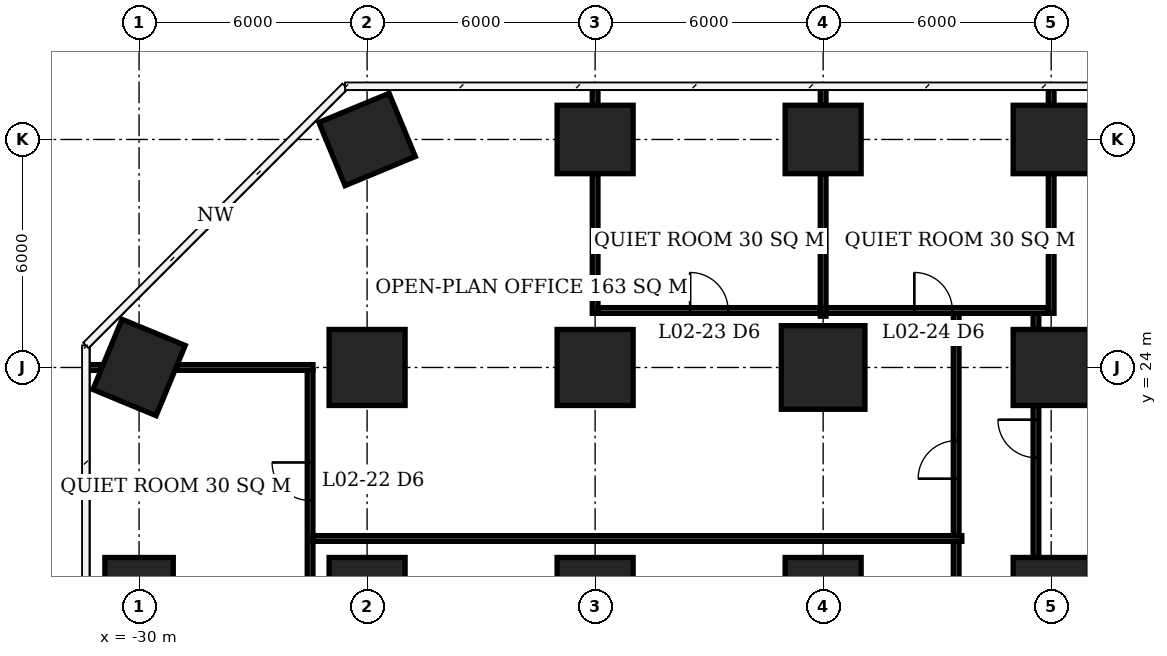
"""IFC4 building model, lengths in metres.
Left out: names, types, materials, properties, quantities, classifications, styles, units other than length and angle.
Written with IfcOpenShell. Run it as: python <this file> out.ifc"""

import sys

from ifc_helpers import new_model, si_unit, direction, frame, frame_2d, origin, origin_2d, place, context, subcontext, project, spatial, rectangle, extrude, element, fill, save


model = new_model("IFC4")
c1 = context("Model", 3, precision=1e-05, world=origin(), true_north=direction((0.0, 1.0)))
c2 = subcontext(c1, "Body", "Model", "MODEL_VIEW")
j1 = project(units=[si_unit("LENGTHUNIT", "METRE"), si_unit("PLANEANGLEUNIT", "RADIAN")], contexts=[c1])
p1 = place(None, origin())
s1 = spatial("IfcSite", under=j1, at=p1, CompositionType="ELEMENT")
p2 = place(p1, origin())
s2 = spatial("IfcBuilding", under=s1, at=p2, CompositionType="ELEMENT")
p3 = place(p2, frame((0.0, 0.0, 11.0)))
s3 = spatial("IfcBuildingStorey", under=s2, at=p3, CompositionType="ELEMENT", Elevation=11.0)
for number, where, z_axis, x_axis in (
    (1, (-30.0, 18.0, 0.0), (0.0, 0.0, 1.0), (0.0, 1.0, 0.0)),
    (2, (-30.0, 24.0, 0.0), (0.0, 0.0, 1.0), (0.383, 0.924, 0.0)),
):
    element("IfcColumn", number, at=place(p3, frame(where, z_axis=z_axis, x_axis=x_axis)), inside=s3, PredefinedType="COLUMN", context=c2, shape_type="SweptSolid", body=[
        extrude(rectangle(XDim=2.0, YDim=1.8, at=origin_2d()), origin(), (0.0, 0.0, 1.0), 7.2),
    ])
for number, where, z_axis, x_axis in (
    (3, (-24.0, 18.0, 0.0), (0.0, 0.0, 1.0), (1.0, 0.0, 0.0)),
    (4, (-24.0, 24.0, 0.0), (0.0, 0.0, 1.0), (1.0, 0.0, 0.0)),
):
    element("IfcColumn", number, at=place(p3, frame(where, z_axis=z_axis, x_axis=x_axis)), inside=s3, PredefinedType="COLUMN", context=c2, shape_type="SweptSolid", body=[
        extrude(rectangle(XDim=2.0, YDim=2.0, at=origin_2d()), origin(), (0.0, 0.0, 1.0), 7.2),
    ])
p4 = place(p3, frame((-24.0, 30.0, 0.0), z_axis=(0.0, 0.0, 1.0), x_axis=(0.923879532511, 0.382683432365, 0.0)))
e5 = element("IfcColumn", 5, at=p4, inside=s3, PredefinedType="COLUMN", context=c2, shape_type="SweptSolid", body=[
    extrude(rectangle(XDim=2.0, YDim=1.8, at=origin_2d()), origin(), (0.0, 0.0, 1.0), 7.2),
])
for number, where, z_axis, x_axis in (
    (6, (-18.0, 18.0, 0.0), (0.0, 0.0, 1.0), (1.0, 0.0, 0.0)),
    (7, (-18.0, 24.0, 0.0), (0.0, 0.0, 1.0), (1.0, 0.0, 0.0)),
):
    element("IfcColumn", number, at=place(p3, frame(where, z_axis=z_axis, x_axis=x_axis)), inside=s3, PredefinedType="COLUMN", context=c2, shape_type="SweptSolid", body=[
        extrude(rectangle(XDim=2.0, YDim=2.0, at=origin_2d()), origin(), (0.0, 0.0, 1.0), 7.2),
    ])
p5 = place(p3, frame((-18.0, 30.0, 0.0), z_axis=(0.0, 0.0, 1.0), x_axis=(1.0, 0.0, 0.0)))
e8 = element("IfcColumn", 8, at=p5, inside=s3, PredefinedType="COLUMN", context=c2, shape_type="SweptSolid", body=[
    extrude(rectangle(XDim=2.0, YDim=1.8, at=origin_2d()), origin(), (0.0, 0.0, 1.0), 7.2),
])
p6 = place(p3, frame((-12.0, 18.0, 0.0), z_axis=(0.0, 0.0, 1.0), x_axis=(1.0, 0.0, 0.0)))
e9 = element("IfcColumn", 9, at=p6, inside=s3, PredefinedType="COLUMN", context=c2, shape_type="SweptSolid", body=[
    extrude(rectangle(XDim=2.0, YDim=2.0, at=origin_2d()), origin(), (0.0, 0.0, 1.0), 7.2),
])
p7 = place(p3, frame((-12.0, 24.0, 0.0), z_axis=(0.0, 0.0, 1.0), x_axis=(1.0, 0.0, 0.0)))
e10 = element("IfcColumn", 10, at=p7, inside=s3, PredefinedType="COLUMN", context=c2, shape_type="SweptSolid", body=[
    extrude(rectangle(XDim=2.2, YDim=2.2, at=origin_2d()), origin(), (0.0, 0.0, 1.0), 7.2),
])
p8 = place(p3, frame((-12.0, 30.0, 0.0), z_axis=(0.0, 0.0, 1.0), x_axis=(1.0, 0.0, 0.0)))
e11 = element("IfcColumn", 11, at=p8, inside=s3, PredefinedType="COLUMN", context=c2, shape_type="SweptSolid", body=[
    extrude(rectangle(XDim=2.0, YDim=1.8, at=origin_2d()), origin(), (0.0, 0.0, 1.0), 7.2),
])
for number, where, z_axis, x_axis in (
    (12, (-6.0, 18.0, 0.0), (0.0, 0.0, 1.0), (1.0, 0.0, 0.0)),
    (13, (-6.0, 24.0, 0.0), (0.0, 0.0, 1.0), (1.0, 0.0, 0.0)),
):
    element("IfcColumn", number, at=place(p3, frame(where, z_axis=z_axis, x_axis=x_axis)), inside=s3, PredefinedType="COLUMN", context=c2, shape_type="SweptSolid", body=[
        extrude(rectangle(XDim=2.0, YDim=2.0, at=origin_2d()), origin(), (0.0, 0.0, 1.0), 7.2),
    ])
p9 = place(p3, frame((-6.0, 30.0, 0.0), z_axis=(0.0, 0.0, 1.0), x_axis=(1.0, 0.0, 0.0)))
e14 = element("IfcColumn", 14, at=p9, inside=s3, PredefinedType="COLUMN", context=c2, shape_type="SweptSolid", body=[
    extrude(rectangle(XDim=2.0, YDim=1.8, at=origin_2d()), origin(), (0.0, 0.0, 1.0), 7.2),
])
p10 = place(p3, frame((-31.375, 24.0, 0.0), z_axis=(0.0, 0.0, 1.0), x_axis=(1.0, 0.0, 0.0)))
e15 = element("IfcWall", 15, at=p10, inside=s3, PredefinedType="PARTITIONING", context=c2, shape_type="SweptSolid", body=[
    extrude(rectangle(XDim=0.37, YDim=0.15, at=frame_2d((0.185, 0.0))), origin(), (0.0, 0.0, 1.0), 6.8),
])
p11 = place(p3, frame((-28.995, 24.0, 0.0), z_axis=(0.0, 0.0, 1.0), x_axis=(1.0, 0.0, 0.0)))
e16 = element("IfcWall", 16, at=p11, inside=s3, PredefinedType="PARTITIONING", context=c2, shape_type="SweptSolid", body=[
    extrude(rectangle(XDim=3.57, YDim=0.15, at=frame_2d((1.785, 0.0))), origin(), (0.0, 0.0, 1.0), 6.8),
])
p12 = place(p3, frame((-17.925, 25.5, 0.0), z_axis=(0.0, 0.0, 1.0), x_axis=(1.0, 0.0, 0.0)))
e17 = element("IfcWall", 17, at=p12, inside=s3, PredefinedType="PARTITIONING", context=c2, shape_type="SweptSolid", body=[
    extrude(rectangle(XDim=5.85, YDim=0.15, at=frame_2d((2.925, 0.0))), origin(), (0.0, 0.0, 1.0), 6.8),
])
p13 = place(p12, frame((2.425, 0.0, 0.0)))
e18 = element("IfcOpeningElement", 18, at=p13, cuts=e17, PredefinedType="OPENING", context=c2, shape_type="SweptSolid", body=[
    extrude(rectangle(XDim=1.0, YDim=2.1, at=frame_2d((0.5, 1.05))), frame((0.0, 0.085, 0.0), z_axis=(0.0, -1.0, 0.0), x_axis=(1.0, 0.0, 0.0)), (0.0, 0.0, 1.0), 0.17),
])
p14 = place(p3, frame((-11.925, 25.5, 0.0), z_axis=(0.0, 0.0, 1.0), x_axis=(1.0, 0.0, 0.0)))
e19 = element("IfcWall", 19, at=p14, inside=s3, PredefinedType="PARTITIONING", context=c2, shape_type="SweptSolid", body=[
    extrude(rectangle(XDim=5.85, YDim=0.15, at=frame_2d((2.925, 0.0))), origin(), (0.0, 0.0, 1.0), 6.8),
])
p15 = place(p14, frame((2.325, 0.0, 0.0)))
e20 = element("IfcOpeningElement", 20, at=p15, cuts=e19, PredefinedType="OPENING", context=c2, shape_type="SweptSolid", body=[
    extrude(rectangle(XDim=1.0, YDim=2.1, at=frame_2d((0.5, 1.05))), frame((0.0, 0.085, 0.0), z_axis=(0.0, -1.0, 0.0), x_axis=(1.0, 0.0, 0.0)), (0.0, 0.0, 1.0), 0.17),
])
p16 = place(p3, frame((-25.5, 18.075, 0.0), z_axis=(0.0, 0.0, 1.0), x_axis=(0.0, 1.0, 0.0)))
e21 = element("IfcWall", 21, at=p16, inside=s3, PredefinedType="PARTITIONING", context=c2, shape_type="SweptSolid", body=[
    extrude(rectangle(XDim=5.85, YDim=0.15, at=frame_2d((2.925, 0.0))), origin(), (0.0, 0.0, 1.0), 6.8),
])
p17 = place(p16, frame((2.425, 0.0, 0.0)))
e22 = element("IfcOpeningElement", 22, at=p17, cuts=e21, PredefinedType="OPENING", context=c2, shape_type="SweptSolid", body=[
    extrude(rectangle(XDim=1.0, YDim=2.1, at=frame_2d((0.5, 1.05))), frame((0.0, 0.085, 0.0), z_axis=(0.0, -1.0, 0.0), x_axis=(1.0, 0.0, 0.0)), (0.0, 0.0, 1.0), 0.17),
])
p18 = place(p3, frame((-18.0, 25.425, 0.0), z_axis=(0.0, 0.0, 1.0), x_axis=(0.0, 1.0, 0.0)))
e23 = element("IfcWall", 23, at=p18, inside=s3, PredefinedType="PARTITIONING", context=c2, shape_type="SweptSolid", body=[
    extrude(rectangle(XDim=3.675, YDim=0.15, at=frame_2d((1.837, 0.0))), origin(), (0.0, 0.0, 1.0), 6.8),
])
p19 = place(p3, frame((-18.0, 30.9, 0.0), z_axis=(0.0, 0.0, 1.0), x_axis=(0.0, 1.0, 0.0)))
e24 = element("IfcWall", 24, at=p19, inside=s3, PredefinedType="PARTITIONING", context=c2, shape_type="SweptSolid", body=[
    extrude(rectangle(XDim=0.475, YDim=0.15, at=frame_2d((0.238, 0.0))), origin(), (0.0, 0.0, 1.0), 6.8),
])
p20 = place(p3, frame((-12.0, 25.35, 0.0), z_axis=(0.0, 0.0, 1.0), x_axis=(0.0, 1.0, 0.0)))
e25 = element("IfcWall", 25, at=p20, inside=s3, PredefinedType="PARTITIONING", context=c2, shape_type="SweptSolid", body=[
    extrude(rectangle(XDim=3.75, YDim=0.15, at=frame_2d((1.875, 0.0))), origin(), (0.0, 0.0, 1.0), 6.8),
])
p21 = place(p3, frame((-12.0, 30.9, 0.0), z_axis=(0.0, 0.0, 1.0), x_axis=(0.0, 1.0, 0.0)))
e26 = element("IfcWall", 26, at=p21, inside=s3, PredefinedType="PARTITIONING", context=c2, shape_type="SweptSolid", body=[
    extrude(rectangle(XDim=0.475, YDim=0.15, at=frame_2d((0.238, 0.0))), origin(), (0.0, 0.0, 1.0), 6.8),
])
p22 = place(p3, frame((-6.0, 25.425, 0.0), z_axis=(0.0, 0.0, 1.0), x_axis=(0.0, 1.0, 0.0)))
e27 = element("IfcWall", 27, at=p22, inside=s3, PredefinedType="PARTITIONING", context=c2, shape_type="SweptSolid", body=[
    extrude(rectangle(XDim=3.675, YDim=0.15, at=frame_2d((1.837, 0.0))), origin(), (0.0, 0.0, 1.0), 6.8),
])
p23 = place(p3, frame((-6.0, 30.9, 0.0), z_axis=(0.0, 0.0, 1.0), x_axis=(0.0, 1.0, 0.0)))
e28 = element("IfcWall", 28, at=p23, inside=s3, PredefinedType="PARTITIONING", context=c2, shape_type="SweptSolid", body=[
    extrude(rectangle(XDim=0.475, YDim=0.15, at=frame_2d((0.238, 0.0))), origin(), (0.0, 0.0, 1.0), 6.8),
])
p24 = place(p3, frame((-25.425, 19.5, 0.0), z_axis=(0.0, 0.0, 1.0), x_axis=(1.0, 0.0, 0.0)))
e29 = element("IfcWall", 29, at=p24, inside=s3, PredefinedType="PARTITIONING", context=c2, shape_type="SweptSolid", body=[
    extrude(rectangle(XDim=17.075, YDim=0.15, at=frame_2d((8.538, 0.0))), origin(), (0.0, 0.0, 1.0), 6.95),
])
p25 = place(p3, frame((-8.5, 7.575, 0.0), z_axis=(0.0, 0.0, 1.0), x_axis=(0.0, 1.0, 0.0)))
e30 = element("IfcWall", 30, at=p25, inside=s3, PredefinedType="PARTITIONING", context=c2, shape_type="SweptSolid", body=[
    extrude(rectangle(XDim=11.85, YDim=0.15, at=frame_2d((5.925, 0.0))), origin(), (0.0, 0.0, 1.0), 6.95),
])
p26 = place(p25, frame((3.625, 0.0, 0.0)))
e31 = element("IfcOpeningElement", 31, at=p26, cuts=e30, PredefinedType="OPENING", context=c2, shape_type="SweptSolid", body=[
    extrude(rectangle(XDim=1.0, YDim=2.1, at=frame_2d((0.5, 1.05))), frame((0.0, 0.085, 0.0), z_axis=(0.0, -1.0, 0.0), x_axis=(1.0, 0.0, 0.0)), (0.0, 0.0, 1.0), 0.17),
])
p27 = place(p3, frame((-8.5, 19.575, 0.0), z_axis=(0.0, 0.0, 1.0), x_axis=(0.0, 1.0, 0.0)))
e32 = element("IfcWall", 32, at=p27, inside=s3, PredefinedType="PARTITIONING", context=c2, shape_type="SweptSolid", body=[
    extrude(rectangle(XDim=5.85, YDim=0.15, at=frame_2d((2.925, 0.0))), origin(), (0.0, 0.0, 1.0), 6.95),
])
p28 = place(p27, frame((1.499, 0.0, 0.0)))
e33 = element("IfcOpeningElement", 33, at=p28, cuts=e32, PredefinedType="OPENING", context=c2, shape_type="SweptSolid", body=[
    extrude(rectangle(XDim=1.0, YDim=2.1, at=frame_2d((0.5, 1.05))), frame((0.0, 0.085, 0.0), z_axis=(0.0, -1.0, 0.0), x_axis=(1.0, 0.0, 0.0)), (0.0, 0.0, 1.0), 0.17),
])
p29 = place(p3, frame((-6.4, 19.0, 0.0), z_axis=(0.0, 0.0, 1.0), x_axis=(0.0, 1.0, 0.0)))
e34 = element("IfcWall", 34, at=p29, inside=s3, PredefinedType="PARTITIONING", context=c2, shape_type="SweptSolid", body=[
    extrude(rectangle(XDim=4.0, YDim=0.15, at=frame_2d((2.0, 0.0))), origin(), (0.0, 0.0, 1.0), 6.95),
])
p30 = place(p29, frame((2.626, 0.0, 0.0)))
e35 = element("IfcOpeningElement", 35, at=p30, cuts=e34, PredefinedType="OPENING", context=c2, shape_type="SweptSolid", body=[
    extrude(rectangle(XDim=1.0, YDim=2.1, at=frame_2d((0.5, 1.05))), frame((0.0, 0.085, 0.0), z_axis=(0.0, -1.0, 0.0), x_axis=(1.0, 0.0, 0.0)), (0.0, 0.0, 1.0), 0.17),
])
p31 = place(p3, frame((-6.4, 25.0, 0.0), z_axis=(0.0, 0.0, 1.0), x_axis=(0.0, 1.0, 0.0)))
e36 = element("IfcWall", 36, at=p31, inside=s3, PredefinedType="PARTITIONING", context=c2, shape_type="SweptSolid", body=[
    extrude(rectangle(XDim=0.425, YDim=0.15, at=frame_2d((0.212, 0.0))), origin(), (0.0, 0.0, 1.0), 6.95),
])
p32 = place(p17, origin())
e37 = element("IfcDoor", 37, at=p32, inside=s3, OperationType="SINGLE_SWING_RIGHT", PredefinedType="DOOR", context=c2, shape_type="SweptSolid", body=[
    extrude(rectangle(XDim=1.0, YDim=2.1, at=frame_2d((0.5, 1.05))), frame((0.0, 0.025, 0.0), z_axis=(0.0, -1.0, 0.0), x_axis=(1.0, 0.0, 0.0)), (0.0, 0.0, 1.0), 0.05),
])
fill(e22, e37)
p33 = place(p13, origin())
e38 = element("IfcDoor", 38, at=p33, inside=s3, OperationType="SINGLE_SWING_LEFT", PredefinedType="DOOR", context=c2, shape_type="SweptSolid", body=[
    extrude(rectangle(XDim=1.0, YDim=2.1, at=frame_2d((0.5, 1.05))), frame((0.0, 0.025, 0.0), z_axis=(0.0, -1.0, 0.0), x_axis=(1.0, 0.0, 0.0)), (0.0, 0.0, 1.0), 0.05),
])
fill(e18, e38)
p34 = place(p15, origin())
e39 = element("IfcDoor", 39, at=p34, inside=s3, OperationType="SINGLE_SWING_LEFT", PredefinedType="DOOR", context=c2, shape_type="SweptSolid", body=[
    extrude(rectangle(XDim=1.0, YDim=2.1, at=frame_2d((0.5, 1.05))), frame((0.0, 0.025, 0.0), z_axis=(0.0, -1.0, 0.0), x_axis=(1.0, 0.0, 0.0)), (0.0, 0.0, 1.0), 0.05),
])
fill(e20, e39)
p35 = place(p30, origin())
e40 = element("IfcDoor", 40, at=p35, inside=s3, OperationType="SINGLE_SWING_RIGHT", PredefinedType="DOOR", context=c2, shape_type="SweptSolid", body=[
    extrude(rectangle(XDim=1.0, YDim=2.1, at=frame_2d((0.5, 1.05))), frame((0.0, 0.025, 0.0), z_axis=(0.0, -1.0, 0.0), x_axis=(1.0, 0.0, 0.0)), (0.0, 0.0, 1.0), 0.05),
])
fill(e35, e40)
p36 = place(p28, origin())
e41 = element("IfcDoor", 41, at=p36, inside=s3, OperationType="SINGLE_SWING_LEFT", PredefinedType="DOOR", context=c2, shape_type="SweptSolid", body=[
    extrude(rectangle(XDim=1.0, YDim=2.1, at=frame_2d((0.5, 1.05))), frame((0.0, 0.025, 0.0), z_axis=(0.0, -1.0, 0.0), x_axis=(1.0, 0.0, 0.0)), (0.0, 0.0, 1.0), 0.05),
])
fill(e33, e41)
save(model, sys.argv[1])
